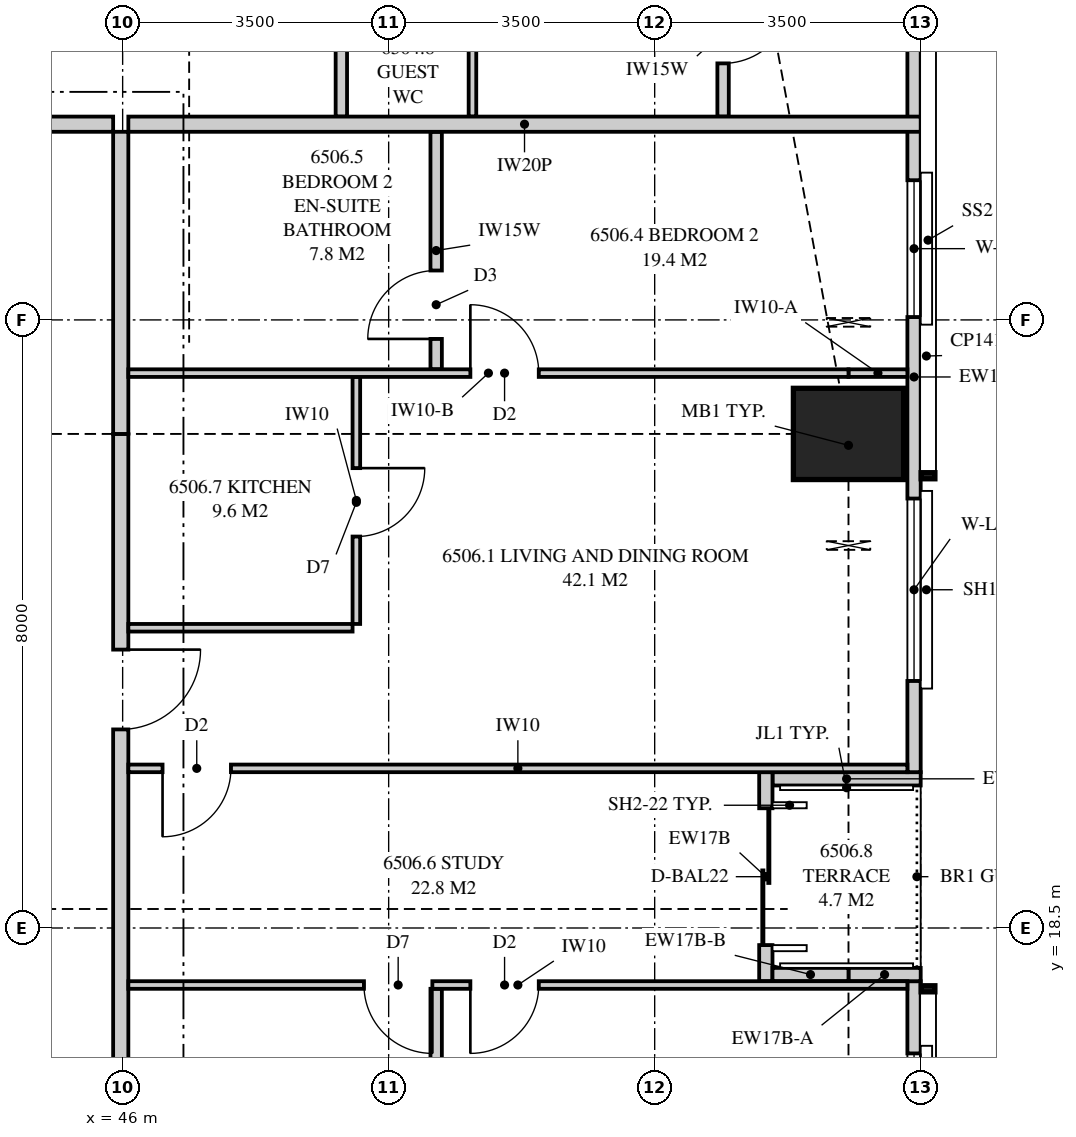
"""IFC4 building model, lengths in metres.
Left out: names, types, materials, properties, quantities, classifications, styles, units other than length and angle.
Written with IfcOpenShell. Run it as: python <this file> out.ifc"""

import sys

from ifc_helpers import new_model, si_unit, direction, frame, frame_2d, origin, origin_2d, place, context, subcontext, project, spatial, polyline, rectangle, outline, extrude, element, fill, save


model = new_model("IFC4")
c1 = context("Model", 3, precision=1e-05, world=origin(), true_north=direction((0.0, 1.0)))
c2 = subcontext(c1, "Body", "Model", "MODEL_VIEW")
j1 = project(units=[si_unit("LENGTHUNIT", "METRE"), si_unit("PLANEANGLEUNIT", "RADIAN")], contexts=[c1])
p1 = place(None, origin())
s1 = spatial("IfcSite", under=j1, at=p1, CompositionType="ELEMENT")
p2 = place(p1, origin())
s2 = spatial("IfcBuilding", under=s1, at=p2, CompositionType="ELEMENT")
p3 = place(p2, frame((0.0, 0.0, 238.95)))
s3 = spatial("IfcBuildingStorey", under=s2, at=p3, CompositionType="ELEMENT", Elevation=238.95)
p4 = place(p3, frame((55.55, 25.0, 0.0), z_axis=(0.0, 0.0, 1.0), x_axis=(1.0, 0.0, 0.0)))
e1 = element("IfcColumn", 1, at=p4, inside=s3, PredefinedType="COLUMN", context=c2, shape_type="SweptSolid", body=[
    extrude(rectangle(XDim=1.45, YDim=1.2, at=origin_2d()), origin(), (0.0, 0.0, 1.0), 3.5),
])
p5 = place(p3, frame((56.413, 3.051, 0.0), z_axis=(0.0, 0.0, 1.0), x_axis=(0.0, 1.0, 0.0)))
e2 = element("IfcWall", 2, at=p5, inside=s3, PredefinedType="SOLIDWALL", context=c2, shape_type="SweptSolid", body=[
    extrude(outline(polyline([(0.0, 0.0), (14.749, 0.0), (14.749, 2.3), (9.949, 2.3), (9.949, 3.26), (9.858, 3.26), (9.858, 2.3), (9.688, 2.3), (9.688, 3.26), (0.0, 3.26), (0.0, 0.0)])), frame((0.0, 0.087, 0.0), z_axis=(0.0, -1.0, 0.0), x_axis=(1.0, 0.0, 0.0)), (0.0, 0.0, 1.0), 0.175),
])
p6 = place(p5, frame((6.64, 0.0, 0.4)))
e3 = element("IfcOpeningElement", 3, at=p6, cuts=e2, PredefinedType="OPENING", context=c2, shape_type="SweptSolid", body=[
    extrude(rectangle(XDim=2.4, YDim=1.85, at=frame_2d((1.2, 0.925))), frame((0.0, 0.097, 0.0), z_axis=(0.0, -1.0, 0.0), x_axis=(1.0, 0.0, 0.0)), (0.0, 0.0, 1.0), 0.195),
])
p7 = place(p5, frame((11.999, 0.0, 0.4)))
e4 = element("IfcOpeningElement", 4, at=p7, cuts=e2, PredefinedType="OPENING", context=c2, shape_type="SweptSolid", body=[
    extrude(rectangle(XDim=1.8, YDim=1.85, at=frame_2d((0.9, 0.925))), frame((0.0, 0.097, 0.0), z_axis=(0.0, -1.0, 0.0), x_axis=(1.0, 0.0, 0.0)), (0.0, 0.0, 1.0), 0.195),
])
p8 = place(p3, frame((56.413, 20.55, 0.0), z_axis=(0.0, 0.0, 1.0), x_axis=(0.0, 1.0, 0.0)))
e5 = element("IfcWall", 5, at=p8, inside=s3, PredefinedType="SOLIDWALL", context=c2, shape_type="SweptSolid", body=[
    extrude(outline(polyline([(0.0, 0.0), (10.399, 0.0), (10.399, 3.26), (4.658, 3.26), (4.658, 2.3), (4.594, 2.3), (4.594, 3.26), (4.45, 3.26), (4.45, 2.3), (0.0, 2.3), (0.0, 0.0)])), frame((0.0, 0.087, 0.0), z_axis=(0.0, -1.0, 0.0), x_axis=(1.0, 0.0, 0.0)), (0.0, 0.0, 1.0), 0.175),
])
p9 = place(p8, frame((1.2, 0.0, 0.4)))
e6 = element("IfcOpeningElement", 6, at=p9, cuts=e5, PredefinedType="OPENING", context=c2, shape_type="SweptSolid", body=[
    extrude(rectangle(XDim=2.4, YDim=1.85, at=frame_2d((1.2, 0.925))), frame((0.0, 0.097, 0.0), z_axis=(0.0, -1.0, 0.0), x_axis=(1.0, 0.0, 0.0)), (0.0, 0.0, 1.0), 0.195),
])
p10 = place(p8, frame((5.988, 0.0, 0.4)))
e7 = element("IfcOpeningElement", 7, at=p10, cuts=e5, PredefinedType="OPENING", context=c2, shape_type="SweptSolid", body=[
    extrude(rectangle(XDim=1.8, YDim=1.85, at=frame_2d((0.9, 0.925))), frame((0.0, 0.097, 0.0), z_axis=(0.0, -1.0, 0.0), x_axis=(1.0, 0.0, 0.0)), (0.0, 0.0, 1.0), 0.195),
])
p11 = place(p3, frame((54.462, 17.8, 0.0), z_axis=(0.0, 0.0, 1.0), x_axis=(0.0, 1.0, 0.0)))
e8 = element("IfcWall", 8, at=p11, inside=s3, PredefinedType="SOLIDWALL", context=c2, shape_type="SweptSolid", body=[
    extrude(outline(polyline([(0.0, 0.0), (2.75, 0.0), (2.75, 3.26), (2.15, 3.26), (2.15, 2.66), (0.0, 2.66), (0.0, 0.0)])), frame((0.0, 0.087, 0.0), z_axis=(0.0, -1.0, 0.0), x_axis=(1.0, 0.0, 0.0)), (0.0, 0.0, 1.0), 0.175),
])
p12 = place(p11, frame((0.475, 0.0, 0.0)))
e9 = element("IfcOpeningElement", 9, at=p12, cuts=e8, PredefinedType="OPENING", context=c2, shape_type="SweptSolid", body=[
    extrude(rectangle(XDim=1.8, YDim=2.25, at=frame_2d((0.9, 1.125))), frame((0.0, 0.097, 0.0), z_axis=(0.0, -1.0, 0.0), x_axis=(1.0, 0.0, 0.0)), (0.0, 0.0, 1.0), 0.195),
])
p13 = place(p3, frame((56.5, 17.887, 0.0), z_axis=(0.0, 0.0, 1.0), x_axis=(-1.0, 0.0, 0.0)))
e10 = element("IfcWall", 10, at=p13, inside=s3, PredefinedType="SOLIDWALL", context=c2, shape_type="SweptSolid", body=[
    extrude(outline(polyline([(0.0, 0.0), (0.95, 0.0), (0.95, 2.3), (0.15, 2.3), (0.15, 3.26), (0.0, 3.26), (0.0, 0.0)])), frame((0.0, 0.087, 0.0), z_axis=(0.0, -1.0, 0.0), x_axis=(1.0, 0.0, 0.0)), (0.0, 0.0, 1.0), 0.175),
])
p14 = place(p3, frame((55.55, 17.887, 0.0), z_axis=(0.0, 0.0, 1.0), x_axis=(-1.0, 0.0, 0.0)))
e11 = element("IfcWall", 11, at=p14, inside=s3, PredefinedType="SOLIDWALL", context=c2, shape_type="SweptSolid", body=[
    extrude(outline(polyline([(0.0, 0.0), (1.0, 0.0), (1.0, 2.66), (0.8, 2.66), (0.8, 2.3), (0.0, 2.3), (0.0, 0.0)])), frame((0.0, 0.087, 0.0), z_axis=(0.0, -1.0, 0.0), x_axis=(1.0, 0.0, 0.0)), (0.0, 0.0, 1.0), 0.175),
])
p15 = place(p3, frame((56.5, 20.462, 0.0), z_axis=(0.0, 0.0, 1.0), x_axis=(-1.0, 0.0, 0.0)))
e12 = element("IfcWall", 12, at=p15, inside=s3, PredefinedType="SOLIDWALL", context=c2, shape_type="SweptSolid", body=[
    extrude(outline(polyline([(0.0, 0.0), (1.95, 0.0), (1.95, 3.26), (1.75, 3.26), (1.75, 2.3), (0.15, 2.3), (0.15, 3.26), (0.0, 3.26), (0.0, 0.0)])), frame((0.0, 0.087, 0.0), z_axis=(0.0, -1.0, 0.0), x_axis=(1.0, 0.0, 0.0)), (0.0, 0.0, 1.0), 0.175),
])
p16 = place(p3, frame((18.0, 29.075, 0.0), z_axis=(0.0, 0.0, 1.0), x_axis=(1.0, 0.0, 0.0)))
e13 = element("IfcWall", 13, at=p16, inside=s3, PredefinedType="PARTITIONING", context=c2, shape_type="SweptSolid", body=[
    extrude(outline(polyline([(0.0, 0.0), (27.875, 0.0), (27.875, 3.26), (27.875, 2.66), (27.565, 2.66), (27.565, 3.26), (20.56, 3.26), (20.56, 2.66), (17.94, 2.66), (17.94, 3.26), (10.935, 3.26), (10.935, 2.66), (8.315, 2.66), (8.315, 3.26), (2.192, 3.26), (2.192, 2.3), (0.256, 2.3), (0.256, 3.26), (0.0, 3.26), (0.0, 0.0)])), frame((0.0, 0.1, 0.0), z_axis=(0.0, -1.0, 0.0), x_axis=(1.0, 0.0, 0.0)), (0.0, 0.0, 1.0), 0.2),
])
p17 = place(p16, frame((18.75, 0.0, 0.0)))
e14 = element("IfcOpeningElement", 14, at=p17, cuts=e13, PredefinedType="OPENING", context=c2, shape_type="SweptSolid", body=[
    extrude(rectangle(XDim=1.05, YDim=2.2, at=frame_2d((0.525, 1.1))), frame((0.0, 0.11, 0.0), z_axis=(0.0, -1.0, 0.0), x_axis=(1.0, 0.0, 0.0)), (0.0, 0.0, 1.0), 0.22),
])
p18 = place(p3, frame((53.9, 31.4, 0.0), z_axis=(0.0, 0.0, 1.0), x_axis=(0.0, -1.0, 0.0)))
e15 = element("IfcWall", 15, at=p18, inside=s3, PredefinedType="PLUMBINGWALL", context=c2, shape_type="SweptSolid", body=[
    extrude(outline(polyline([(0.0, 0.0), (2.225, 0.0), (2.225, 3.26), (2.225, 2.3), (0.438, 2.3), (0.0, 2.3), (0.0, 3.26), (0.0, 0.0)])), frame((0.0, 0.075, 0.0), z_axis=(0.0, -1.0, 0.0), x_axis=(1.0, 0.0, 0.0)), (0.0, 0.0, 1.0), 0.15),
])
p19 = place(p18, frame((0.625, 0.0, 0.0)))
e16 = element("IfcOpeningElement", 16, at=p19, cuts=e15, PredefinedType="OPENING", context=c2, shape_type="SweptSolid", body=[
    extrude(rectangle(XDim=0.9, YDim=2.1, at=frame_2d((0.45, 1.05))), frame((0.0, 0.085, 0.0), z_axis=(0.0, -1.0, 0.0), x_axis=(1.0, 0.0, 0.0)), (0.0, 0.0, 1.0), 0.17),
])
p20 = place(p3, frame((50.603, 33.825, 0.0), z_axis=(0.0, 0.0, 1.0), x_axis=(0.0, -1.0, 0.0)))
e17 = element("IfcWall", 17, at=p20, inside=s3, PredefinedType="PARTITIONING", context=c2, shape_type="SweptSolid", body=[
    extrude(outline(polyline([(0.0, 0.0), (4.65, 0.0), (4.65, 3.26), (2.279, 3.26), (2.279, 2.3), (0.534, 2.3), (0.534, 3.26), (0.0, 3.26), (0.0, 0.0)])), frame((0.0, 0.05, 0.0), z_axis=(0.0, -1.0, 0.0), x_axis=(1.0, 0.0, 0.0)), (0.0, 0.0, 1.0), 0.1),
])
p21 = place(p20, frame((0.15, 0.0, 0.0)))
e18 = element("IfcOpeningElement", 18, at=p21, cuts=e17, PredefinedType="OPENING", context=c2, shape_type="SweptSolid", body=[
    extrude(rectangle(XDim=0.9, YDim=2.1, at=frame_2d((0.45, 1.05))), frame((0.0, 0.06, 0.0), z_axis=(0.0, -1.0, 0.0), x_axis=(1.0, 0.0, 0.0)), (0.0, 0.0, 1.0), 0.12),
])
p22 = place(p3, frame((46.075, 29.075, 0.0), z_axis=(0.0, 0.0, 1.0), x_axis=(1.0, 0.0, 0.0)))
e19 = element("IfcWall", 19, at=p22, inside=s3, PredefinedType="PARTITIONING", context=c2, shape_type="SweptSolid", body=[
    extrude(outline(polyline([(0.0, 0.0), (10.425, 0.0), (10.425, 3.26), (9.646, 3.26), (9.646, 2.3), (7.795, 2.3), (7.795, 3.26), (2.11, 3.26), (2.11, 2.66), (0.0, 2.66), (0.0, 3.26), (0.0, 0.0)])), frame((0.0, 0.1, 0.0), z_axis=(0.0, -1.0, 0.0), x_axis=(1.0, 0.0, 0.0)), (0.0, 0.0, 1.0), 0.2),
])
p23 = place(p3, frame((45.975, 14.25, 0.0), z_axis=(0.0, 0.0, 1.0), x_axis=(0.0, 1.0, 0.0)))
e20 = element("IfcWall", 20, at=p23, inside=s3, PredefinedType="PARTITIONING", context=c2, shape_type="SweptSolid", body=[
    extrude(outline(polyline([(0.0, 0.0), (10.75, 0.0), (10.75, 2.66), (9.44, 2.66), (9.44, 3.26), (5.81, 3.26), (5.81, 2.66), (3.19, 2.66), (3.19, 3.26), (0.06, 3.26), (0.06, 2.66), (0.0, 2.66), (0.0, 0.0)])), frame((0.0, 0.1, 0.0), z_axis=(0.0, -1.0, 0.0), x_axis=(1.0, 0.0, 0.0)), (0.0, 0.0, 1.0), 0.2),
])
p24 = place(p23, frame((6.863, 0.0, 0.0)))
e21 = element("IfcOpeningElement", 21, at=p24, cuts=e20, PredefinedType="OPENING", context=c2, shape_type="SweptSolid", body=[
    extrude(rectangle(XDim=1.05, YDim=2.2, at=frame_2d((0.525, 1.1))), frame((0.0, 0.11, 0.0), z_axis=(0.0, -1.0, 0.0), x_axis=(1.0, 0.0, 0.0)), (0.0, 0.0, 1.0), 0.22),
])
p25 = place(p3, frame((45.975, 25.0, 0.0), z_axis=(0.0, 0.0, 1.0), x_axis=(0.0, 1.0, 0.0)))
e22 = element("IfcWall", 22, at=p25, inside=s3, PredefinedType="PARTITIONING", context=c2, shape_type="SweptSolid", body=[
    extrude(rectangle(XDim=3.975, YDim=0.2, at=frame_2d((1.988, 0.0))), origin(), (0.0, 0.0, 1.0), 2.66),
])
p26 = place(p3, frame((56.325, 17.75, 0.0), z_axis=(0.0, 0.0, 1.0), x_axis=(-1.0, 0.0, 0.0)))
e23 = element("IfcWall", 23, at=p26, inside=s3, PredefinedType="PARTITIONING", context=c2, shape_type="SweptSolid", body=[
    extrude(outline(polyline([(0.0, 0.0), (10.25, 0.0), (10.25, 3.26), (10.25, 2.66), (1.635, 2.66), (1.635, 2.3), (0.0, 2.3), (0.0, 3.26), (0.0, 0.0)])), frame((0.0, 0.05, 0.0), z_axis=(0.0, -1.0, 0.0), x_axis=(1.0, 0.0, 0.0)), (0.0, 0.0, 1.0), 0.1),
])
p27 = place(p26, frame((4.85, 0.0, 0.0)))
e24 = element("IfcOpeningElement", 24, at=p27, cuts=e23, PredefinedType="OPENING", context=c2, shape_type="SweptSolid", body=[
    extrude(rectangle(XDim=0.9, YDim=2.1, at=frame_2d((0.45, 1.05))), frame((0.0, 0.06, 0.0), z_axis=(0.0, -1.0, 0.0), x_axis=(1.0, 0.0, 0.0)), (0.0, 0.0, 1.0), 0.12),
])
p28 = place(p26, frame((6.25, 0.0, 0.0)))
e25 = element("IfcOpeningElement", 25, at=p28, cuts=e23, PredefinedType="OPENING", context=c2, shape_type="SweptSolid", body=[
    extrude(rectangle(XDim=0.9, YDim=2.1, at=frame_2d((0.45, 1.05))), frame((0.0, 0.06, 0.0), z_axis=(0.0, -1.0, 0.0), x_axis=(1.0, 0.0, 0.0)), (0.0, 0.0, 1.0), 0.12),
])
p29 = place(p3, frame((56.325, 25.8, 0.0), z_axis=(0.0, 0.0, 1.0), x_axis=(-1.0, 0.0, 0.0)))
e26 = element("IfcWall", 26, at=p29, inside=s3, PredefinedType="PARTITIONING", context=c2, shape_type="SweptSolid", body=[
    extrude(outline(polyline([(0.0, 0.0), (0.775, 0.0), (0.775, 2.3), (0.048, 2.3), (0.048, 3.26), (0.0, 3.26), (0.0, 0.0)])), frame((0.0, 0.05, 0.0), z_axis=(0.0, -1.0, 0.0), x_axis=(1.0, 0.0, 0.0)), (0.0, 0.0, 1.0), 0.1),
])
p30 = place(p3, frame((55.55, 25.8, 0.0), z_axis=(0.0, 0.0, 1.0), x_axis=(-1.0, 0.0, 0.0)))
e27 = element("IfcWall", 27, at=p30, inside=s3, PredefinedType="PARTITIONING", context=c2, shape_type="SweptSolid", body=[
    extrude(outline(polyline([(0.0, 0.0), (9.475, 0.0), (9.475, 2.66), (1.023, 2.66), (1.023, 2.3), (0.0, 2.3), (0.0, 0.0)])), frame((0.0, 0.05, 0.0), z_axis=(0.0, -1.0, 0.0), x_axis=(1.0, 0.0, 0.0)), (0.0, 0.0, 1.0), 0.1),
])
p31 = place(p30, frame((4.075, 0.0, 0.0)))
e28 = element("IfcOpeningElement", 28, at=p31, cuts=e27, PredefinedType="OPENING", context=c2, shape_type="SweptSolid", body=[
    extrude(rectangle(XDim=0.9, YDim=2.1, at=frame_2d((0.45, 1.05))), frame((0.0, 0.06, 0.0), z_axis=(0.0, -1.0, 0.0), x_axis=(1.0, 0.0, 0.0)), (0.0, 0.0, 1.0), 0.12),
])
p32 = place(p3, frame((50.125, 14.25, 0.0), z_axis=(0.0, 0.0, 1.0), x_axis=(0.0, 1.0, 0.0)))
e29 = element("IfcWall", 29, at=p32, inside=s3, PredefinedType="PLUMBINGWALL", context=c2, shape_type="SweptSolid", body=[
    extrude(outline(polyline([(0.0, 0.0), (3.45, 0.0), (3.45, 3.26), (3.45, 2.66), (3.215, 2.66), (3.215, 3.26), (0.035, 3.26), (0.035, 2.66), (0.0, 2.66), (0.0, 3.26), (0.0, 0.0)])), frame((0.0, 0.075, 0.0), z_axis=(0.0, -1.0, 0.0), x_axis=(1.0, 0.0, 0.0)), (0.0, 0.0, 1.0), 0.15),
])
p33 = place(p3, frame((50.125, 25.85, 0.0), z_axis=(0.0, 0.0, 1.0), x_axis=(0.0, 1.0, 0.0)))
e30 = element("IfcWall", 30, at=p33, inside=s3, PredefinedType="PLUMBINGWALL", context=c2, shape_type="SweptSolid", body=[
    extrude(outline(polyline([(0.0, 0.0), (3.125, 0.0), (3.125, 3.26), (0.435, 3.26), (0.435, 2.66), (0.0, 2.66), (0.0, 3.26), (0.0, 0.0)])), frame((0.0, 0.075, 0.0), z_axis=(0.0, -1.0, 0.0), x_axis=(1.0, 0.0, 0.0)), (0.0, 0.0, 1.0), 0.15),
])
p34 = place(p33, frame((0.4, 0.0, 0.0)))
e31 = element("IfcOpeningElement", 31, at=p34, cuts=e30, PredefinedType="OPENING", context=c2, shape_type="SweptSolid", body=[
    extrude(rectangle(XDim=0.9, YDim=2.1, at=frame_2d((0.45, 1.05))), frame((0.0, 0.085, 0.0), z_axis=(0.0, -1.0, 0.0), x_axis=(1.0, 0.0, 0.0)), (0.0, 0.0, 1.0), 0.17),
])
p35 = place(p3, frame((56.325, 20.6, 0.0), z_axis=(0.0, 0.0, 1.0), x_axis=(-1.0, 0.0, 0.0)))
e32 = element("IfcWall", 32, at=p35, inside=s3, PredefinedType="PARTITIONING", context=c2, shape_type="SweptSolid", body=[
    extrude(outline(polyline([(0.0, 0.0), (10.25, 0.0), (10.25, 3.26), (1.635, 3.26), (1.635, 2.3), (0.0, 2.3), (0.0, 3.26), (0.0, 0.0)])), frame((0.0, 0.05, 0.0), z_axis=(0.0, -1.0, 0.0), x_axis=(1.0, 0.0, 0.0)), (0.0, 0.0, 1.0), 0.1),
])
p36 = place(p35, frame((8.9, 0.0, 0.0)))
e33 = element("IfcOpeningElement", 33, at=p36, cuts=e32, PredefinedType="OPENING", context=c2, shape_type="SweptSolid", body=[
    extrude(rectangle(XDim=0.9, YDim=2.1, at=frame_2d((0.45, 1.05))), frame((0.0, 0.06, 0.0), z_axis=(0.0, -1.0, 0.0), x_axis=(1.0, 0.0, 0.0)), (0.0, 0.0, 1.0), 0.12),
])
p37 = place(p3, frame((49.075, 22.5, 0.0), z_axis=(0.0, 0.0, 1.0), x_axis=(0.0, 1.0, 0.0)))
e34 = element("IfcWall", 34, at=p37, inside=s3, PredefinedType="PARTITIONING", context=c2, shape_type="SweptSolid", body=[
    extrude(outline(polyline([(0.0, 0.0), (3.25, 0.0), (3.25, 3.26), (3.25, 2.66), (1.24, 2.66), (1.24, 3.26), (0.0, 3.26), (0.0, 0.0)])), frame((0.0, 0.05, 0.0), z_axis=(0.0, -1.0, 0.0), x_axis=(1.0, 0.0, 0.0)), (0.0, 0.0, 1.0), 0.1),
])
p38 = place(p37, frame((1.15, 0.0, 0.0)))
e35 = element("IfcOpeningElement", 35, at=p38, cuts=e34, PredefinedType="OPENING", context=c2, shape_type="SweptSolid", body=[
    extrude(rectangle(XDim=0.9, YDim=2.1, at=frame_2d((0.45, 1.05))), frame((0.0, 0.06, 0.0), z_axis=(0.0, -1.0, 0.0), x_axis=(1.0, 0.0, 0.0)), (0.0, 0.0, 1.0), 0.12),
])
p39 = place(p3, frame((49.025, 22.45, 0.0), z_axis=(0.0, 0.0, 1.0), x_axis=(-1.0, 0.0, 0.0)))
e36 = element("IfcWall", 36, at=p39, inside=s3, PredefinedType="PARTITIONING", context=c2, shape_type="SweptSolid", body=[
    extrude(rectangle(XDim=2.95, YDim=0.1, at=frame_2d((1.475, 0.0))), origin(), (0.0, 0.0, 1.0), 3.26),
])
p40 = place(p3, frame((48.877, 29.175, 0.0), z_axis=(0.0, 0.0, 1.0), x_axis=(0.0, 1.0, 0.0)))
e37 = element("IfcWall", 37, at=p40, inside=s3, PredefinedType="PLUMBINGWALL", context=c2, shape_type="SweptSolid", body=[
    extrude(rectangle(XDim=2.0, YDim=0.15, at=frame_2d((1.0, 0.0))), origin(), (0.0, 0.0, 1.0), 3.26),
])
p41 = place(p7, origin())
e38 = element("IfcWindow", 38, at=p41, inside=s3, PartitioningType="SINGLE_PANEL", PredefinedType="WINDOW", context=c2, shape_type="SweptSolid", body=[
    extrude(rectangle(XDim=1.8, YDim=1.85, at=frame_2d((0.9, 0.925))), frame((0.0, 0.03, 0.0), z_axis=(0.0, -1.0, 0.0), x_axis=(1.0, 0.0, 0.0)), (0.0, 0.0, 1.0), 0.06),
])
fill(e4, e38)
p42 = place(p12, origin())
e39 = element("IfcDoor", 39, at=p42, inside=s3, OperationType="SLIDING_TO_LEFT", PredefinedType="DOOR", context=c2, shape_type="SweptSolid", body=[
    extrude(rectangle(XDim=1.8, YDim=2.25, at=frame_2d((0.9, 1.125))), frame((0.0, 0.025, 0.0), z_axis=(0.0, -1.0, 0.0), x_axis=(1.0, 0.0, 0.0)), (0.0, 0.0, 1.0), 0.05),
])
fill(e9, e39)
p43 = place(p9, origin())
e40 = element("IfcWindow", 40, at=p43, inside=s3, PartitioningType="SINGLE_PANEL", PredefinedType="WINDOW", context=c2, shape_type="SweptSolid", body=[
    extrude(rectangle(XDim=2.4, YDim=1.85, at=frame_2d((1.2, 0.925))), frame((0.0, 0.03, 0.0), z_axis=(0.0, -1.0, 0.0), x_axis=(1.0, 0.0, 0.0)), (0.0, 0.0, 1.0), 0.06),
])
fill(e6, e40)
p44 = place(p10, origin())
e41 = element("IfcWindow", 41, at=p44, inside=s3, PartitioningType="SINGLE_PANEL", PredefinedType="WINDOW", context=c2, shape_type="SweptSolid", body=[
    extrude(rectangle(XDim=1.8, YDim=1.85, at=frame_2d((0.9, 0.925))), frame((0.0, 0.03, 0.0), z_axis=(0.0, -1.0, 0.0), x_axis=(1.0, 0.0, 0.0)), (0.0, 0.0, 1.0), 0.06),
])
fill(e7, e41)
p45 = place(p19, origin())
e42 = element("IfcDoor", 42, at=p45, inside=s3, OperationType="SINGLE_SWING_LEFT", PredefinedType="DOOR", context=c2, shape_type="SweptSolid", body=[
    extrude(rectangle(XDim=0.9, YDim=2.1, at=frame_2d((0.45, 1.05))), frame((0.0, 0.025, 0.0), z_axis=(0.0, -1.0, 0.0), x_axis=(1.0, 0.0, 0.0)), (0.0, 0.0, 1.0), 0.05),
])
fill(e16, e42)
p46 = place(p24, frame((1.05, 0.0, 0.0), z_axis=(0.0, 0.0, 1.0), x_axis=(-1.0, 0.0, 0.0)))
e43 = element("IfcDoor", 43, at=p46, inside=s3, OperationType="SINGLE_SWING_LEFT", PredefinedType="DOOR", context=c2, shape_type="SweptSolid", body=[
    extrude(rectangle(XDim=1.05, YDim=2.2, at=frame_2d((0.525, 1.1))), frame((0.0, 0.025, 0.0), z_axis=(0.0, -1.0, 0.0), x_axis=(1.0, 0.0, 0.0)), (0.0, 0.0, 1.0), 0.05),
])
fill(e21, e43)
p47 = place(p27, origin())
e44 = element("IfcDoor", 44, at=p47, inside=s3, OperationType="SINGLE_SWING_RIGHT", PredefinedType="DOOR", context=c2, shape_type="SweptSolid", body=[
    extrude(rectangle(XDim=0.9, YDim=2.1, at=frame_2d((0.45, 1.05))), frame((0.0, 0.025, 0.0), z_axis=(0.0, -1.0, 0.0), x_axis=(1.0, 0.0, 0.0)), (0.0, 0.0, 1.0), 0.05),
])
fill(e24, e44)
p48 = place(p28, origin())
e45 = element("IfcDoor", 45, at=p48, inside=s3, OperationType="SINGLE_SWING_LEFT", PredefinedType="DOOR", context=c2, shape_type="SweptSolid", body=[
    extrude(rectangle(XDim=0.9, YDim=2.1, at=frame_2d((0.45, 1.05))), frame((0.0, 0.025, 0.0), z_axis=(0.0, -1.0, 0.0), x_axis=(1.0, 0.0, 0.0)), (0.0, 0.0, 1.0), 0.05),
])
fill(e25, e45)
p49 = place(p31, frame((0.9, 0.0, 0.0), z_axis=(0.0, 0.0, 1.0), x_axis=(-1.0, 0.0, 0.0)))
e46 = element("IfcDoor", 46, at=p49, inside=s3, OperationType="SINGLE_SWING_LEFT", PredefinedType="DOOR", context=c2, shape_type="SweptSolid", body=[
    extrude(rectangle(XDim=0.9, YDim=2.1, at=frame_2d((0.45, 1.05))), frame((0.0, 0.025, 0.0), z_axis=(0.0, -1.0, 0.0), x_axis=(1.0, 0.0, 0.0)), (0.0, 0.0, 1.0), 0.05),
])
fill(e28, e46)
p50 = place(p34, origin())
e47 = element("IfcDoor", 47, at=p50, inside=s3, OperationType="SINGLE_SWING_LEFT", PredefinedType="DOOR", context=c2, shape_type="SweptSolid", body=[
    extrude(rectangle(XDim=0.9, YDim=2.1, at=frame_2d((0.45, 1.05))), frame((0.0, 0.025, 0.0), z_axis=(0.0, -1.0, 0.0), x_axis=(1.0, 0.0, 0.0)), (0.0, 0.0, 1.0), 0.05),
])
fill(e31, e47)
p51 = place(p36, origin())
e48 = element("IfcDoor", 48, at=p51, inside=s3, OperationType="SINGLE_SWING_RIGHT", PredefinedType="DOOR", context=c2, shape_type="SweptSolid", body=[
    extrude(rectangle(XDim=0.9, YDim=2.1, at=frame_2d((0.45, 1.05))), frame((0.0, 0.025, 0.0), z_axis=(0.0, -1.0, 0.0), x_axis=(1.0, 0.0, 0.0)), (0.0, 0.0, 1.0), 0.05),
])
fill(e33, e48)
p52 = place(p38, frame((0.9, 0.0, 0.0), z_axis=(0.0, 0.0, 1.0), x_axis=(-1.0, 0.0, 0.0)))
e49 = element("IfcDoor", 49, at=p52, inside=s3, OperationType="SINGLE_SWING_LEFT", PredefinedType="DOOR", context=c2, shape_type="SweptSolid", body=[
    extrude(rectangle(XDim=0.9, YDim=2.1, at=frame_2d((0.45, 1.05))), frame((0.0, 0.025, 0.0), z_axis=(0.0, -1.0, 0.0), x_axis=(1.0, 0.0, 0.0)), (0.0, 0.0, 1.0), 0.05),
])
fill(e35, e49)
save(model, sys.argv[1])
